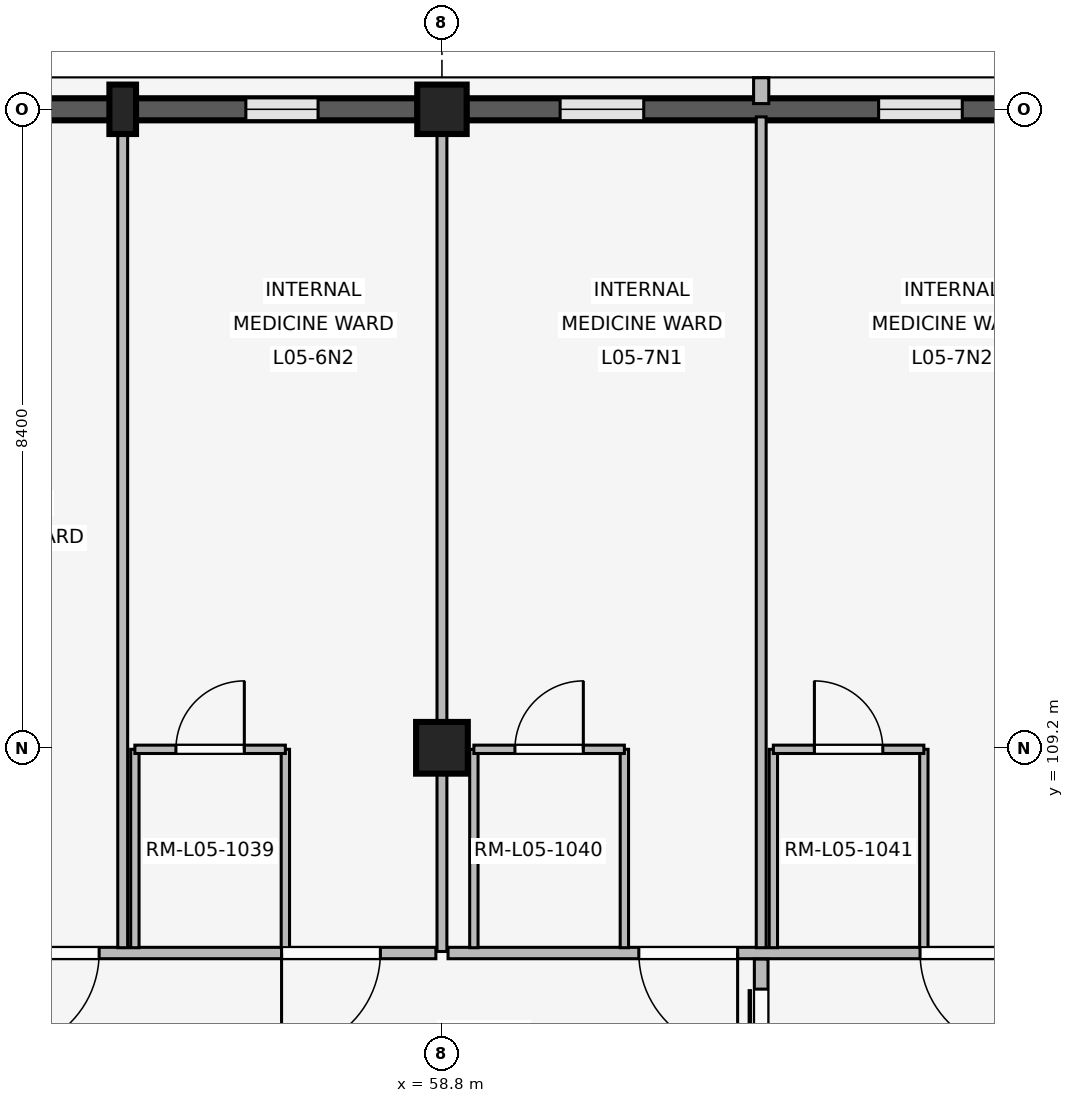
"""IFC4 building model, lengths in metres.
Left out: names, types, materials, properties, quantities, classifications, styles, units other than length and angle.
Written with IfcOpenShell. Run it as: python <this file> out.ifc"""

import sys

from ifc_helpers import new_model, si_unit, direction, frame, frame_2d, origin, origin_2d, place, context, subcontext, project, spatial, rectangle, extrude, element, fill, save


model = new_model("IFC4")
c1 = context("Model", 3, precision=1e-05, world=origin(), true_north=direction((0.0, 1.0)))
c2 = subcontext(c1, "Body", "Model", "MODEL_VIEW")
j1 = project(units=[si_unit("LENGTHUNIT", "METRE"), si_unit("PLANEANGLEUNIT", "RADIAN")], contexts=[c1])
p1 = place(None, origin())
s1 = spatial("IfcSite", under=j1, at=p1, CompositionType="ELEMENT")
p2 = place(p1, origin())
s2 = spatial("IfcBuilding", under=s1, at=p2, CompositionType="ELEMENT")
p3 = place(p2, frame((0.0, 0.0, 20.4)))
s3 = spatial("IfcBuildingStorey", under=s2, at=p3, CompositionType="ELEMENT", Elevation=20.4)
p4 = place(p3, frame((58.8, 109.2, 0.0), z_axis=(0.0, 0.0, 1.0), x_axis=(1.0, 0.0, 0.0)))
e1 = element("IfcColumn", 1, at=p4, inside=s3, PredefinedType="COLUMN", context=c2, shape_type="SweptSolid", body=[
    extrude(rectangle(XDim=0.68, YDim=0.68, at=origin_2d()), origin(), (0.0, 0.0, 1.0), 4.2),
])
p5 = place(p3, frame((58.8, 117.6, 0.0), z_axis=(0.0, 0.0, 1.0), x_axis=(1.0, 0.0, 0.0)))
e2 = element("IfcColumn", 2, at=p5, inside=s3, PredefinedType="COLUMN", context=c2, shape_type="SweptSolid", body=[
    extrude(rectangle(XDim=0.65, YDim=0.65, at=origin_2d()), origin(), (0.0, 0.0, 1.0), 4.2),
])
p6 = place(p3, frame((54.6, 117.6, 0.0), z_axis=(0.0, 0.0, 1.0), x_axis=(1.0, 0.0, 0.0)))
e3 = element("IfcColumn", 3, at=p6, inside=s3, PredefinedType="PILASTER", context=c2, shape_type="SweptSolid", body=[
    extrude(rectangle(XDim=0.35, YDim=0.65, at=origin_2d()), origin(), (0.0, 0.0, 1.0), 4.2),
])
p7 = place(p3, frame((50.72, 117.6, 0.0), z_axis=(0.0, 0.0, 1.0), x_axis=(1.0, 0.0, 0.0)))
e4 = element("IfcWall", 4, at=p7, inside=s3, PredefinedType="SOLIDWALL", context=c2, shape_type="SweptSolid", body=[
    extrude(rectangle(XDim=7.76, YDim=0.29, at=frame_2d((3.88, 0.0))), origin(), (0.0, 0.0, 1.0), 3.34),
])
p8 = place(p7, frame((1.31, 0.0, 0.85)))
e5 = element("IfcOpeningElement", 5, at=p8, cuts=e4, PredefinedType="OPENING", context=c2, shape_type="SweptSolid", body=[
    extrude(rectangle(XDim=0.95, YDim=1.6, at=frame_2d((0.475, 0.8))), frame((0.0, 0.155, 0.0), z_axis=(0.0, -1.0, 0.0), x_axis=(1.0, 0.0, 0.0)), (0.0, 0.0, 1.0), 0.31),
])
p9 = place(p7, frame((5.5, 0.0, 0.85)))
e6 = element("IfcOpeningElement", 6, at=p9, cuts=e4, PredefinedType="OPENING", context=c2, shape_type="SweptSolid", body=[
    extrude(rectangle(XDim=0.95, YDim=1.6, at=frame_2d((0.475, 0.8))), frame((0.0, 0.155, 0.0), z_axis=(0.0, -1.0, 0.0), x_axis=(1.0, 0.0, 0.0)), (0.0, 0.0, 1.0), 0.31),
])
p10 = place(p3, frame((59.12, 117.6, 0.0), z_axis=(0.0, 0.0, 1.0), x_axis=(1.0, 0.0, 0.0)))
e7 = element("IfcWall", 7, at=p10, inside=s3, PredefinedType="SOLIDWALL", context=c2, shape_type="SweptSolid", body=[
    extrude(rectangle(XDim=7.76, YDim=0.29, at=frame_2d((3.88, 0.0))), origin(), (0.0, 0.0, 1.0), 3.34),
])
p11 = place(p10, frame((1.235, 0.0, 0.85)))
e8 = element("IfcOpeningElement", 8, at=p11, cuts=e7, PredefinedType="OPENING", context=c2, shape_type="SweptSolid", body=[
    extrude(rectangle(XDim=1.1, YDim=1.6, at=frame_2d((0.55, 0.8))), frame((0.0, 0.155, 0.0), z_axis=(0.0, -1.0, 0.0), x_axis=(1.0, 0.0, 0.0)), (0.0, 0.0, 1.0), 0.31),
])
p12 = place(p10, frame((5.425, 0.0, 0.85)))
e9 = element("IfcOpeningElement", 9, at=p12, cuts=e7, PredefinedType="OPENING", context=c2, shape_type="SweptSolid", body=[
    extrude(rectangle(XDim=1.1, YDim=1.6, at=frame_2d((0.55, 0.8))), frame((0.0, 0.155, 0.0), z_axis=(0.0, -1.0, 0.0), x_axis=(1.0, 0.0, 0.0)), (0.0, 0.0, 1.0), 0.31),
])
p13 = place(p3, frame((63.0, 117.675, 0.0), z_axis=(0.0, 0.0, 1.0), x_axis=(0.0, 1.0, 0.0)))
e10 = element("IfcWall", 10, at=p13, inside=s3, PredefinedType="ELEMENTEDWALL", context=c2, shape_type="SweptSolid", body=[
    extrude(rectangle(XDim=0.34, YDim=0.2, at=frame_2d((0.17, 0.0))), origin(), (0.0, 0.0, 1.0), 3.32),
])
p14 = place(p3, frame((58.72, 106.5, 0.0), z_axis=(0.0, 0.0, 1.0), x_axis=(-1.0, 0.0, 0.0)))
e11 = element("IfcWall", 11, at=p14, inside=s3, PredefinedType="PARTITIONING", context=c2, shape_type="SweptSolid", body=[
    extrude(rectangle(XDim=7.96, YDim=0.15, at=frame_2d((3.98, 0.0))), origin(), (0.0, 0.0, 1.0), 3.32),
])
p15 = place(p14, frame((0.73, 0.0, 0.0)))
e12 = element("IfcOpeningElement", 12, at=p15, cuts=e11, PredefinedType="OPENING", context=c2, shape_type="SweptSolid", body=[
    extrude(rectangle(XDim=1.3, YDim=2.25, at=frame_2d((0.65, 1.125))), frame((0.0, 0.085, 0.0), z_axis=(0.0, -1.0, 0.0), x_axis=(1.0, 0.0, 0.0)), (0.0, 0.0, 1.0), 0.17),
])
p16 = place(p14, frame((4.43, 0.0, 0.0)))
e13 = element("IfcOpeningElement", 13, at=p16, cuts=e11, PredefinedType="OPENING", context=c2, shape_type="SweptSolid", body=[
    extrude(rectangle(XDim=1.3, YDim=2.25, at=frame_2d((0.65, 1.125))), frame((0.0, 0.085, 0.0), z_axis=(0.0, -1.0, 0.0), x_axis=(1.0, 0.0, 0.0)), (0.0, 0.0, 1.0), 0.17),
])
p17 = place(p3, frame((54.6, 106.57, 0.0), z_axis=(0.0, 0.0, 1.0), x_axis=(0.0, 1.0, 0.0)))
e14 = element("IfcWall", 14, at=p17, inside=s3, PredefinedType="PARTITIONING", context=c2, shape_type="SweptSolid", body=[
    extrude(rectangle(XDim=10.93, YDim=0.13, at=frame_2d((5.465, 0.0))), origin(), (0.0, 0.0, 1.0), 3.32),
])
for number, where, z_axis, x_axis in (
    (15, (54.76, 106.57, 0.0), (0.0, 0.0, 1.0), (0.0, 1.0, 0.0)),
    (16, (56.74, 106.57, 0.0), (0.0, 0.0, 1.0), (0.0, 1.0, 0.0)),
):
    element("IfcWall", number, at=place(p3, frame(where, z_axis=z_axis, x_axis=x_axis)), inside=s3, PredefinedType="PARTITIONING", context=c2, shape_type="SweptSolid", body=[
        extrude(rectangle(XDim=2.61, YDim=0.11, at=frame_2d((1.305, 0.0))), origin(), (0.0, 0.0, 1.0), 3.32),
    ])
p18 = place(p3, frame((54.76, 109.18, 0.0), z_axis=(0.0, 0.0, 1.0), x_axis=(1.0, 0.0, 0.0)))
e17 = element("IfcWall", 17, at=p18, inside=s3, PredefinedType="PARTITIONING", context=c2, shape_type="SweptSolid", body=[
    extrude(rectangle(XDim=1.98, YDim=0.11, at=frame_2d((0.99, 0.0))), origin(), (0.0, 0.0, 1.0), 3.32),
])
p19 = place(p18, frame((0.54, 0.0, 0.0)))
e18 = element("IfcOpeningElement", 18, at=p19, cuts=e17, PredefinedType="OPENING", context=c2, shape_type="SweptSolid", body=[
    extrude(rectangle(XDim=0.9, YDim=2.1, at=frame_2d((0.45, 1.05))), frame((0.0, 0.065, 0.0), z_axis=(0.0, -1.0, 0.0), x_axis=(1.0, 0.0, 0.0)), (0.0, 0.0, 1.0), 0.13),
])
p20 = place(p3, frame((58.8, 106.52, 0.0), z_axis=(0.0, 0.0, 1.0), x_axis=(0.0, 1.0, 0.0)))
e19 = element("IfcWall", 19, at=p20, inside=s3, PredefinedType="PARTITIONING", context=c2, shape_type="SweptSolid", body=[
    extrude(rectangle(XDim=10.94, YDim=0.13, at=frame_2d((5.47, 0.0))), origin(), (0.0, 0.0, 1.0), 3.32),
])
p21 = place(p3, frame((67.12, 106.5, 0.0), z_axis=(0.0, 0.0, 1.0), x_axis=(-1.0, 0.0, 0.0)))
e20 = element("IfcWall", 20, at=p21, inside=s3, PredefinedType="PARTITIONING", context=c2, shape_type="SweptSolid", body=[
    extrude(rectangle(XDim=8.24, YDim=0.15, at=frame_2d((4.12, 0.0))), origin(), (0.0, 0.0, 1.0), 3.32),
])
p22 = place(p21, frame((0.73, 0.0, 0.0)))
e21 = element("IfcOpeningElement", 21, at=p22, cuts=e20, PredefinedType="OPENING", context=c2, shape_type="SweptSolid", body=[
    extrude(rectangle(XDim=1.3, YDim=2.25, at=frame_2d((0.65, 1.125))), frame((0.0, 0.085, 0.0), z_axis=(0.0, -1.0, 0.0), x_axis=(1.0, 0.0, 0.0)), (0.0, 0.0, 1.0), 0.17),
])
p23 = place(p21, frame((4.43, 0.0, 0.0)))
e22 = element("IfcOpeningElement", 22, at=p23, cuts=e20, PredefinedType="OPENING", context=c2, shape_type="SweptSolid", body=[
    extrude(rectangle(XDim=1.3, YDim=2.25, at=frame_2d((0.65, 1.125))), frame((0.0, 0.085, 0.0), z_axis=(0.0, -1.0, 0.0), x_axis=(1.0, 0.0, 0.0)), (0.0, 0.0, 1.0), 0.17),
])
p24 = place(p3, frame((63.0, 106.57, 0.0), z_axis=(0.0, 0.0, 1.0), x_axis=(0.0, 1.0, 0.0)))
e23 = element("IfcWall", 23, at=p24, inside=s3, PredefinedType="PARTITIONING", context=c2, shape_type="SweptSolid", body=[
    extrude(rectangle(XDim=10.93, YDim=0.13, at=frame_2d((5.465, 0.0))), origin(), (0.0, 0.0, 1.0), 3.32),
])
for number, where, z_axis, x_axis in (
    (24, (59.22, 106.57, 0.0), (0.0, 0.0, 1.0), (0.0, 1.0, 0.0)),
    (25, (61.2, 106.57, 0.0), (0.0, 0.0, 1.0), (0.0, 1.0, 0.0)),
):
    element("IfcWall", number, at=place(p3, frame(where, z_axis=z_axis, x_axis=x_axis)), inside=s3, PredefinedType="PARTITIONING", context=c2, shape_type="SweptSolid", body=[
        extrude(rectangle(XDim=2.61, YDim=0.11, at=frame_2d((1.305, 0.0))), origin(), (0.0, 0.0, 1.0), 3.32),
    ])
p25 = place(p3, frame((59.22, 109.18, 0.0), z_axis=(0.0, 0.0, 1.0), x_axis=(1.0, 0.0, 0.0)))
e26 = element("IfcWall", 26, at=p25, inside=s3, PredefinedType="PARTITIONING", context=c2, shape_type="SweptSolid", body=[
    extrude(rectangle(XDim=1.98, YDim=0.11, at=frame_2d((0.99, 0.0))), origin(), (0.0, 0.0, 1.0), 3.32),
])
p26 = place(p25, frame((0.54, 0.0, 0.0)))
e27 = element("IfcOpeningElement", 27, at=p26, cuts=e26, PredefinedType="OPENING", context=c2, shape_type="SweptSolid", body=[
    extrude(rectangle(XDim=0.9, YDim=2.1, at=frame_2d((0.45, 1.05))), frame((0.0, 0.065, 0.0), z_axis=(0.0, -1.0, 0.0), x_axis=(1.0, 0.0, 0.0)), (0.0, 0.0, 1.0), 0.13),
])
for number, where, z_axis, x_axis in (
    (28, (63.16, 106.57, 0.0), (0.0, 0.0, 1.0), (0.0, 1.0, 0.0)),
    (29, (65.14, 106.57, 0.0), (0.0, 0.0, 1.0), (0.0, 1.0, 0.0)),
):
    element("IfcWall", number, at=place(p3, frame(where, z_axis=z_axis, x_axis=x_axis)), inside=s3, PredefinedType="PARTITIONING", context=c2, shape_type="SweptSolid", body=[
        extrude(rectangle(XDim=2.61, YDim=0.11, at=frame_2d((1.305, 0.0))), origin(), (0.0, 0.0, 1.0), 3.32),
    ])
p27 = place(p3, frame((63.16, 109.18, 0.0), z_axis=(0.0, 0.0, 1.0), x_axis=(1.0, 0.0, 0.0)))
e30 = element("IfcWall", 30, at=p27, inside=s3, PredefinedType="PARTITIONING", context=c2, shape_type="SweptSolid", body=[
    extrude(rectangle(XDim=1.98, YDim=0.11, at=frame_2d((0.99, 0.0))), origin(), (0.0, 0.0, 1.0), 3.32),
])
p28 = place(p27, frame((0.54, 0.0, 0.0)))
e31 = element("IfcOpeningElement", 31, at=p28, cuts=e30, PredefinedType="OPENING", context=c2, shape_type="SweptSolid", body=[
    extrude(rectangle(XDim=0.9, YDim=2.1, at=frame_2d((0.45, 1.05))), frame((0.0, 0.065, 0.0), z_axis=(0.0, -1.0, 0.0), x_axis=(1.0, 0.0, 0.0)), (0.0, 0.0, 1.0), 0.13),
])
p29 = place(p3, frame((63.0, 103.58, 0.0), z_axis=(0.0, 0.0, 1.0), x_axis=(0.0, 1.0, 0.0)))
e32 = element("IfcWall", 32, at=p29, inside=s3, PredefinedType="PARTITIONING", context=c2, shape_type="SweptSolid", body=[
    extrude(rectangle(XDim=2.84, YDim=0.18, at=frame_2d((1.42, 0.0))), origin(), (0.0, 0.0, 1.0), 3.32),
])
p30 = place(p29, frame((0.395, 0.0, 0.0)))
e33 = element("IfcOpeningElement", 33, at=p30, cuts=e32, PredefinedType="OPENING", context=c2, shape_type="SweptSolid", body=[
    extrude(rectangle(XDim=2.05, YDim=2.35, at=frame_2d((1.025, 1.175))), frame((0.0, 0.1, 0.0), z_axis=(0.0, -1.0, 0.0), x_axis=(1.0, 0.0, 0.0)), (0.0, 0.0, 1.0), 0.2),
])
p31 = place(p9, origin())
e34 = element("IfcWindow", 34, at=p31, inside=s3, PartitioningType="SINGLE_PANEL", PredefinedType="WINDOW", context=c2, shape_type="SweptSolid", body=[
    extrude(rectangle(XDim=0.95, YDim=1.6, at=frame_2d((0.475, 0.8))), frame((0.0, 0.03, 0.0), z_axis=(0.0, -1.0, 0.0), x_axis=(1.0, 0.0, 0.0)), (0.0, 0.0, 1.0), 0.06),
])
fill(e6, e34)
p32 = place(p11, origin())
e35 = element("IfcWindow", 35, at=p32, inside=s3, PartitioningType="SINGLE_PANEL", PredefinedType="WINDOW", context=c2, shape_type="SweptSolid", body=[
    extrude(rectangle(XDim=1.1, YDim=1.6, at=frame_2d((0.55, 0.8))), frame((0.0, 0.03, 0.0), z_axis=(0.0, -1.0, 0.0), x_axis=(1.0, 0.0, 0.0)), (0.0, 0.0, 1.0), 0.06),
])
fill(e8, e35)
p33 = place(p12, origin())
e36 = element("IfcWindow", 36, at=p33, inside=s3, PartitioningType="SINGLE_PANEL", PredefinedType="WINDOW", context=c2, shape_type="SweptSolid", body=[
    extrude(rectangle(XDim=1.1, YDim=1.6, at=frame_2d((0.55, 0.8))), frame((0.0, 0.03, 0.0), z_axis=(0.0, -1.0, 0.0), x_axis=(1.0, 0.0, 0.0)), (0.0, 0.0, 1.0), 0.06),
])
fill(e9, e36)
p34 = place(p15, origin())
e37 = element("IfcDoor", 37, at=p34, inside=s3, OperationType="SINGLE_SWING_RIGHT", PredefinedType="DOOR", context=c2, shape_type="SweptSolid", body=[
    extrude(rectangle(XDim=1.3, YDim=2.25, at=frame_2d((0.65, 1.125))), frame((0.0, 0.025, 0.0), z_axis=(0.0, -1.0, 0.0), x_axis=(1.0, 0.0, 0.0)), (0.0, 0.0, 1.0), 0.05),
])
fill(e12, e37)
p35 = place(p16, origin())
e38 = element("IfcDoor", 38, at=p35, inside=s3, OperationType="SINGLE_SWING_RIGHT", PredefinedType="DOOR", context=c2, shape_type="SweptSolid", body=[
    extrude(rectangle(XDim=1.3, YDim=2.25, at=frame_2d((0.65, 1.125))), frame((0.0, 0.025, 0.0), z_axis=(0.0, -1.0, 0.0), x_axis=(1.0, 0.0, 0.0)), (0.0, 0.0, 1.0), 0.05),
])
fill(e13, e38)
p36 = place(p19, origin())
e39 = element("IfcDoor", 39, at=p36, inside=s3, OperationType="SINGLE_SWING_RIGHT", PredefinedType="DOOR", context=c2, shape_type="SweptSolid", body=[
    extrude(rectangle(XDim=0.9, YDim=2.1, at=frame_2d((0.45, 1.05))), frame((0.0, 0.025, 0.0), z_axis=(0.0, -1.0, 0.0), x_axis=(1.0, 0.0, 0.0)), (0.0, 0.0, 1.0), 0.05),
])
fill(e18, e39)
p37 = place(p22, origin())
e40 = element("IfcDoor", 40, at=p37, inside=s3, OperationType="SINGLE_SWING_LEFT", PredefinedType="DOOR", context=c2, shape_type="SweptSolid", body=[
    extrude(rectangle(XDim=1.3, YDim=2.25, at=frame_2d((0.65, 1.125))), frame((0.0, 0.025, 0.0), z_axis=(0.0, -1.0, 0.0), x_axis=(1.0, 0.0, 0.0)), (0.0, 0.0, 1.0), 0.05),
])
fill(e21, e40)
p38 = place(p23, origin())
e41 = element("IfcDoor", 41, at=p38, inside=s3, OperationType="SINGLE_SWING_LEFT", PredefinedType="DOOR", context=c2, shape_type="SweptSolid", body=[
    extrude(rectangle(XDim=1.3, YDim=2.25, at=frame_2d((0.65, 1.125))), frame((0.0, 0.025, 0.0), z_axis=(0.0, -1.0, 0.0), x_axis=(1.0, 0.0, 0.0)), (0.0, 0.0, 1.0), 0.05),
])
fill(e22, e41)
p39 = place(p26, origin())
e42 = element("IfcDoor", 42, at=p39, inside=s3, OperationType="SINGLE_SWING_RIGHT", PredefinedType="DOOR", context=c2, shape_type="SweptSolid", body=[
    extrude(rectangle(XDim=0.9, YDim=2.1, at=frame_2d((0.45, 1.05))), frame((0.0, 0.025, 0.0), z_axis=(0.0, -1.0, 0.0), x_axis=(1.0, 0.0, 0.0)), (0.0, 0.0, 1.0), 0.05),
])
fill(e27, e42)
p40 = place(p28, origin())
e43 = element("IfcDoor", 43, at=p40, inside=s3, OperationType="SINGLE_SWING_LEFT", PredefinedType="DOOR", context=c2, shape_type="SweptSolid", body=[
    extrude(rectangle(XDim=0.9, YDim=2.1, at=frame_2d((0.45, 1.05))), frame((0.0, 0.025, 0.0), z_axis=(0.0, -1.0, 0.0), x_axis=(1.0, 0.0, 0.0)), (0.0, 0.0, 1.0), 0.05),
])
fill(e31, e43)
p41 = place(p30, origin())
e44 = element("IfcDoor", 44, at=p41, inside=s3, OperationType="SLIDING_TO_LEFT", PredefinedType="DOOR", context=c2, shape_type="SweptSolid", body=[
    extrude(rectangle(XDim=2.05, YDim=2.35, at=frame_2d((1.025, 1.175))), frame((0.0, 0.025, 0.0), z_axis=(0.0, -1.0, 0.0), x_axis=(1.0, 0.0, 0.0)), (0.0, 0.0, 1.0), 0.05),
])
fill(e33, e44)
save(model, sys.argv[1])
